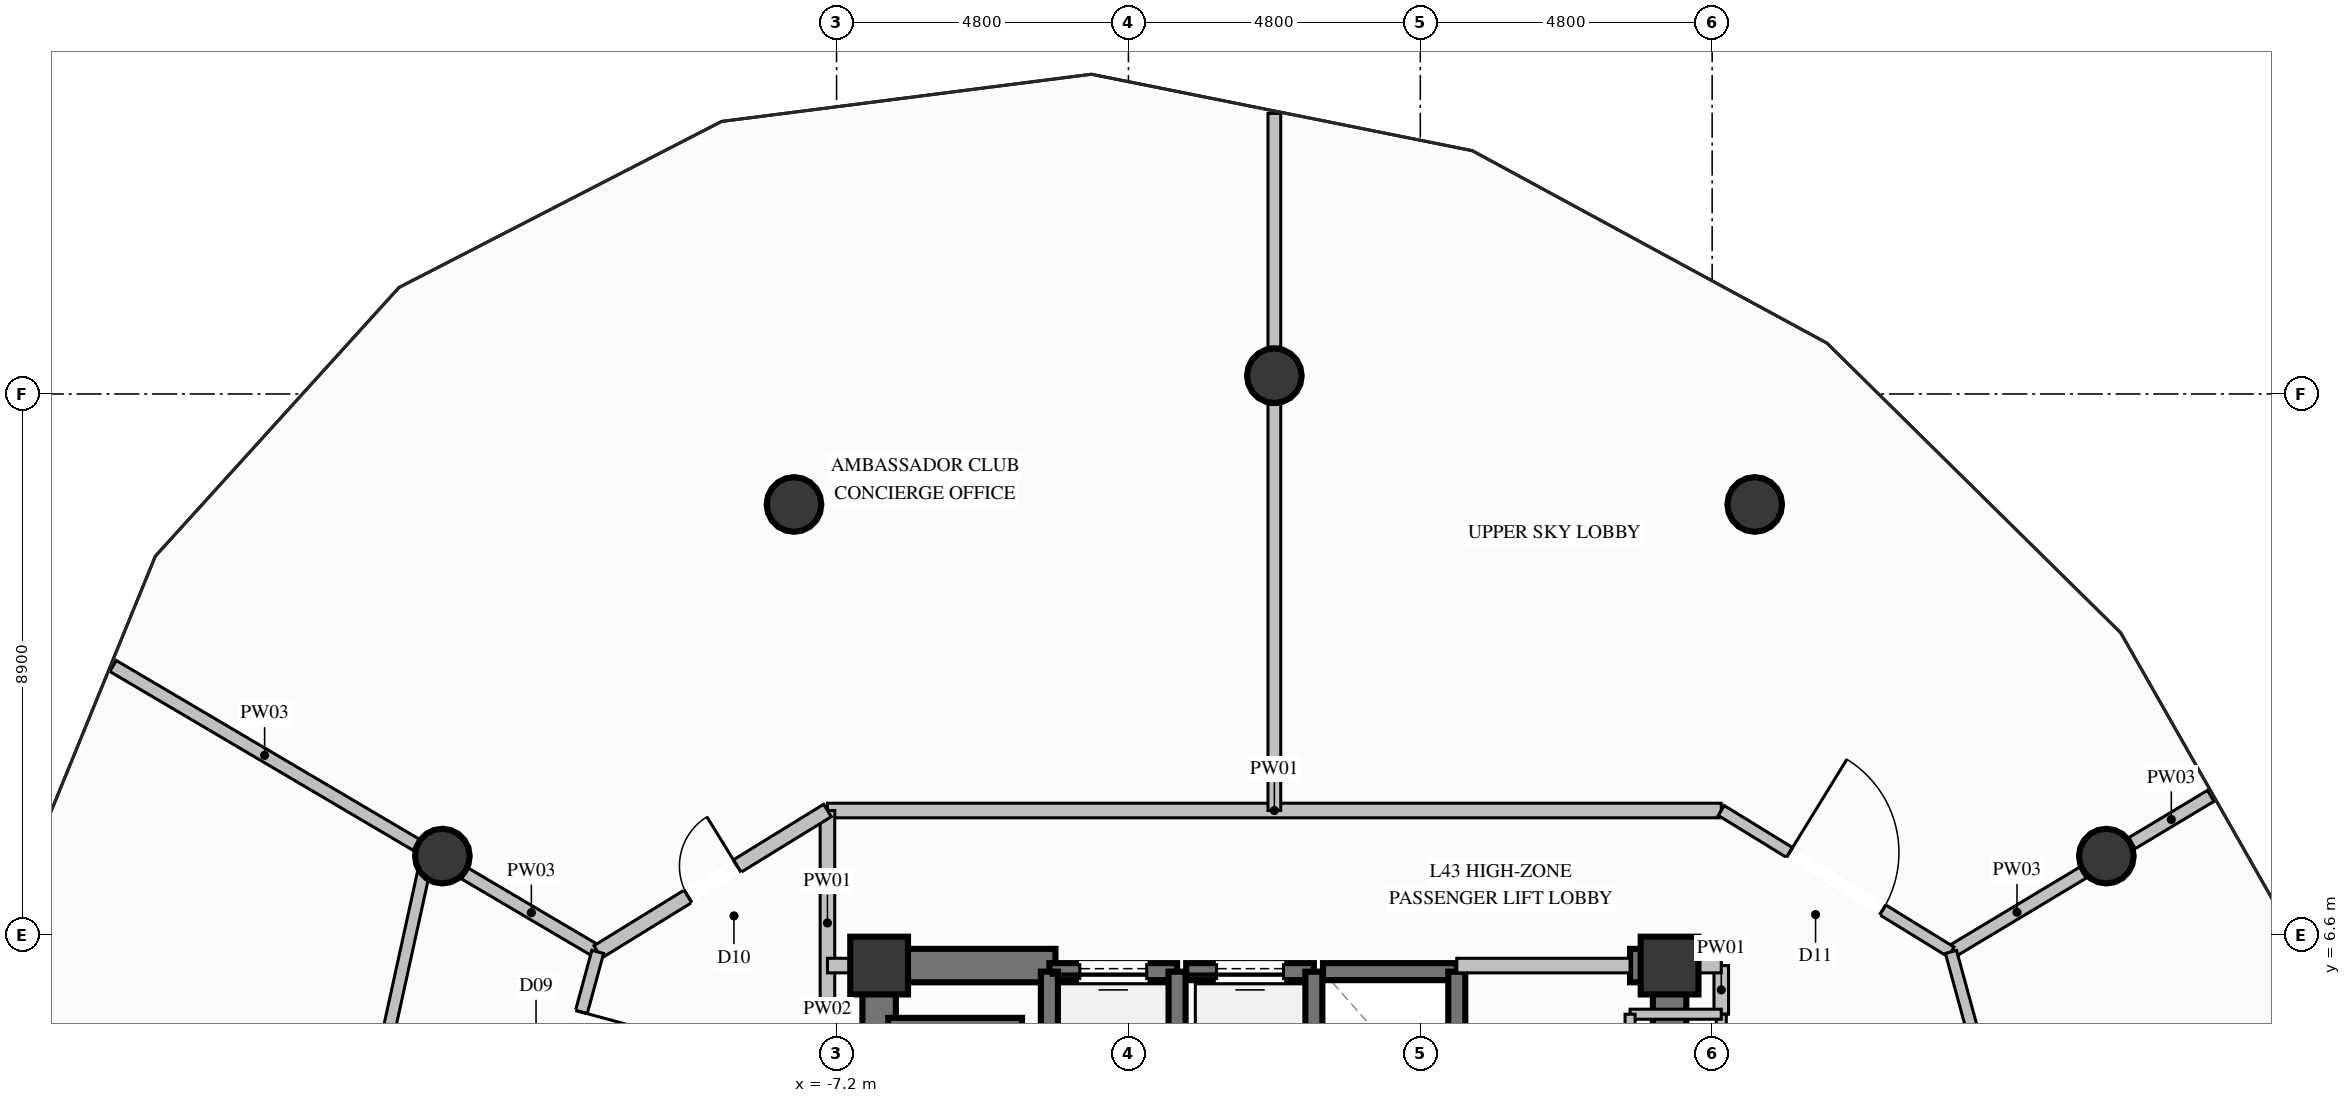
"""IFC4 building model, lengths in metres.
Left out: names, types, materials, properties, quantities, classifications, styles, units other than length and angle.
Written with IfcOpenShell. Run it as: python <this file> out.ifc"""

import sys

from ifc_helpers import new_model, si_unit, direction, frame, frame_2d, origin, origin_2d, place, context, subcontext, project, spatial, rectangle, circle, extrude, element, fill, save


model = new_model("IFC4")
c1 = context("Model", 3, precision=1e-05, world=origin(), true_north=direction((0.0, 1.0)))
c2 = subcontext(c1, "Body", "Model", "MODEL_VIEW")
j1 = project(units=[si_unit("LENGTHUNIT", "METRE"), si_unit("PLANEANGLEUNIT", "RADIAN")], contexts=[c1])
p1 = place(None, origin())
s1 = spatial("IfcSite", under=j1, at=p1, CompositionType="ELEMENT")
p2 = place(p1, origin())
s2 = spatial("IfcBuilding", under=s1, at=p2, CompositionType="ELEMENT")
p3 = place(p2, frame((0.0, 0.0, 168.6)))
s3 = spatial("IfcBuildingStorey", under=s2, at=p3, CompositionType="ELEMENT", Elevation=168.6)
for number, where, z_axis, x_axis in (
    (1, (6.5, 6.1, 0.0), (0.0, 0.0, 1.0), (1.0, 0.0, 0.0)),
    (2, (-6.5, 6.1, 0.0), (0.0, 0.0, 1.0), (1.0, 0.0, 0.0)),
):
    element("IfcColumn", number, at=place(p3, frame(where, z_axis=z_axis, x_axis=x_axis)), inside=s3, PredefinedType="COLUMN", context=c2, shape_type="SweptSolid", body=[
        extrude(rectangle(XDim=0.95, YDim=0.95, at=origin_2d()), origin(), (0.0, 0.0, 1.0), 4.6),
    ])
p4 = place(p3, frame((-6.225, 6.1, 0.0), z_axis=(0.0, 0.0, 1.0), x_axis=(1.0, 0.0, 0.0)))
e3 = element("IfcWall", 3, at=p4, inside=s3, PredefinedType="SHEAR", context=c2, shape_type="SweptSolid", body=[
    extrude(rectangle(XDim=2.625, YDim=0.55, at=frame_2d((1.312, 0.0))), origin(), (0.0, 0.0, 1.0), 4.6),
])
p5 = place(p3, frame((5.85, 6.1, 0.0), z_axis=(0.0, 0.0, 1.0), x_axis=(1.0, 0.0, 0.0)))
e4 = element("IfcWall", 4, at=p5, inside=s3, PredefinedType="SHEAR", context=c2, shape_type="SweptSolid", body=[
    extrude(rectangle(XDim=0.375, YDim=0.55, at=frame_2d((0.188, 0.0))), origin(), (0.0, 0.0, 1.0), 4.6),
])
p6 = place(p3, frame((-6.5, 2.35, 0.0), z_axis=(0.0, 0.0, 1.0), x_axis=(0.0, 1.0, 0.0)))
e5 = element("IfcWall", 5, at=p6, inside=s3, PredefinedType="SHEAR", context=c2, shape_type="SweptSolid", body=[
    extrude(rectangle(XDim=4.025, YDim=0.55, at=frame_2d((2.012, 0.0))), origin(), (0.0, 0.0, 1.0), 4.6),
])
p7 = place(p3, frame((6.5, 3.35, 0.0), z_axis=(0.0, 0.0, 1.0), x_axis=(0.0, 1.0, 0.0)))
e6 = element("IfcWall", 6, at=p7, inside=s3, PredefinedType="SHEAR", context=c2, shape_type="SweptSolid", body=[
    extrude(rectangle(XDim=3.025, YDim=0.55, at=frame_2d((1.512, 0.0))), origin(), (0.0, 0.0, 1.0), 4.6),
])
for number, where, z_axis, x_axis in (
    (7, (13.683, 7.9, 0.0), (0.0, 0.0, 1.0), (1.0, 0.0, 0.0)),
    (8, (7.9, 13.683, 0.0), (0.0, 0.0, 1.0), (1.0, 0.0, 0.0)),
    (9, (0.0, 15.8, 0.0), (0.0, 0.0, 1.0), (1.0, 0.0, 0.0)),
    (10, (-7.9, 13.683, 0.0), (0.0, 0.0, 1.0), (1.0, 0.0, 0.0)),
    (11, (-13.683, 7.9, 0.0), (0.0, 0.0, 1.0), (1.0, 0.0, 0.0)),
):
    element("IfcColumn", number, at=place(p3, frame(where, z_axis=z_axis, x_axis=x_axis)), inside=s3, PredefinedType="COLUMN", context=c2, shape_type="SweptSolid", body=[
        extrude(circle(Radius=0.45, at=origin_2d()), origin(), (0.0, 0.0, 1.0), 4.6),
    ])
p8 = place(p3, frame((-1.6, 6.0, 0.0), z_axis=(0.0, 0.0, 1.0), x_axis=(-1.0, 0.0, 0.0)))
e12 = element("IfcWall", 12, at=p8, inside=s3, PredefinedType="SOLIDWALL", context=c2, shape_type="SweptSolid", body=[
    extrude(rectangle(XDim=2.1, YDim=0.28, at=frame_2d((1.05, 0.0))), origin(), (0.0, 0.0, 1.0), 4.36),
])
p9 = place(p8, frame((0.5, 0.0, 0.0)))
e13 = element("IfcOpeningElement", 13, at=p9, cuts=e12, PredefinedType="OPENING", context=c2, shape_type="SweptSolid", body=[
    extrude(rectangle(XDim=1.1, YDim=2.2, at=frame_2d((0.55, 1.1))), frame((0.0, 0.15, 0.0), z_axis=(0.0, -1.0, 0.0), x_axis=(1.0, 0.0, 0.0)), (0.0, 0.0, 1.0), 0.3),
])
for number, where, z_axis, x_axis in (
    (14, (-3.7, 6.0, 0.0), (0.0, 0.0, 1.0), (0.0, -1.0, 0.0)),
    (15, (-1.6, 3.5, 0.0), (0.0, 0.0, 1.0), (0.0, 1.0, 0.0)),
):
    element("IfcWall", number, at=place(p3, frame(where, z_axis=z_axis, x_axis=x_axis)), inside=s3, PredefinedType="SOLIDWALL", context=c2, shape_type="SweptSolid", body=[
        extrude(rectangle(XDim=2.5, YDim=0.28, at=frame_2d((1.25, 0.0))), origin(), (0.0, 0.0, 1.0), 4.36),
    ])
p10 = place(p3, frame((0.65, 6.0, 0.0), z_axis=(0.0, 0.0, 1.0), x_axis=(-1.0, 0.0, 0.0)))
e16 = element("IfcWall", 16, at=p10, inside=s3, PredefinedType="SOLIDWALL", context=c2, shape_type="SweptSolid", body=[
    extrude(rectangle(XDim=2.1, YDim=0.28, at=frame_2d((1.05, 0.0))), origin(), (0.0, 0.0, 1.0), 4.36),
])
p11 = place(p10, frame((0.5, 0.0, 0.0)))
e17 = element("IfcOpeningElement", 17, at=p11, cuts=e16, PredefinedType="OPENING", context=c2, shape_type="SweptSolid", body=[
    extrude(rectangle(XDim=1.1, YDim=2.2, at=frame_2d((0.55, 1.1))), frame((0.0, 0.15, 0.0), z_axis=(0.0, -1.0, 0.0), x_axis=(1.0, 0.0, 0.0)), (0.0, 0.0, 1.0), 0.3),
])
p12 = place(p3, frame((0.65, 3.5, 0.0), z_axis=(0.0, 0.0, 1.0), x_axis=(0.0, 1.0, 0.0)))
e18 = element("IfcWall", 18, at=p12, inside=s3, PredefinedType="SOLIDWALL", context=c2, shape_type="SweptSolid", body=[
    extrude(rectangle(XDim=2.5, YDim=0.28, at=frame_2d((1.25, 0.0))), origin(), (0.0, 0.0, 1.0), 4.36),
])
p13 = place(p3, frame((3.0, 6.0, 0.0), z_axis=(0.0, 0.0, 1.0), x_axis=(-1.0, 0.0, 0.0)))
e19 = element("IfcWall", 19, at=p13, inside=s3, PredefinedType="SOLIDWALL", context=c2, shape_type="SweptSolid", body=[
    extrude(rectangle(XDim=2.2, YDim=0.28, at=frame_2d((1.1, 0.0))), origin(), (0.0, 0.0, 1.0), 4.36),
])
p14 = place(p3, frame((3.0, 3.5, 0.0), z_axis=(0.0, 0.0, 1.0), x_axis=(0.0, 1.0, 0.0)))
e20 = element("IfcWall", 20, at=p14, inside=s3, PredefinedType="SOLIDWALL", context=c2, shape_type="SweptSolid", body=[
    extrude(rectangle(XDim=2.5, YDim=0.28, at=frame_2d((1.25, 0.0))), origin(), (0.0, 0.0, 1.0), 4.36),
])
p15 = place(p3, frame((-4.15, 5.1, 0.0), z_axis=(0.0, 0.0, 1.0), x_axis=(-1.0, 0.0, 0.0)))
e21 = element("IfcWall", 21, at=p15, inside=s3, PredefinedType="SOLIDWALL", context=c2, shape_type="SweptSolid", body=[
    extrude(rectangle(XDim=2.2, YDim=0.28, at=frame_2d((1.1, 0.0))), origin(), (0.0, 0.0, 1.0), 4.36),
])
p16 = place(p3, frame((-7.35, 8.65, 0.0), z_axis=(0.0, 0.0, 1.0), x_axis=(1.0, 0.0, 0.0)))
e22 = element("IfcWall", 22, at=p16, inside=s3, PredefinedType="PARTITIONING", context=c2, shape_type="SweptSolid", body=[
    extrude(rectangle(XDim=14.7, YDim=0.24, at=frame_2d((7.35, 0.0))), origin(), (0.0, 0.0, 1.0), 4.36),
])
p17 = place(p3, frame((3.0, 6.1, 0.0), z_axis=(0.0, 0.0, 1.0), x_axis=(1.0, 0.0, 0.0)))
e23 = element("IfcWall", 23, at=p17, inside=s3, PredefinedType="PARTITIONING", context=c2, shape_type="SweptSolid", body=[
    extrude(rectangle(XDim=2.85, YDim=0.24, at=frame_2d((1.425, 0.0))), origin(), (0.0, 0.0, 1.0), 3.245),
])
p18 = place(p3, frame((7.35, 5.3, 0.0), z_axis=(0.0, 0.0, 1.0), x_axis=(0.0, 1.0, 0.0)))
e24 = element("IfcWall", 24, at=p18, inside=s3, PredefinedType="PARTITIONING", context=c2, shape_type="SweptSolid", body=[
    extrude(rectangle(XDim=0.8, YDim=0.24, at=frame_2d((0.4, 0.0))), origin(), (0.0, 0.0, 1.0), 3.245),
])
p19 = place(p3, frame((6.5, 6.1, 0.0), z_axis=(0.0, 0.0, 1.0), x_axis=(1.0, 0.0, 0.0)))
e25 = element("IfcWall", 25, at=p19, inside=s3, PredefinedType="PARTITIONING", context=c2, shape_type="SweptSolid", body=[
    extrude(rectangle(XDim=0.85, YDim=0.24, at=frame_2d((0.425, 0.0))), origin(), (0.0, 0.0, 1.0), 3.877),
])
p20 = place(p3, frame((-7.35, 4.95, 0.0), z_axis=(0.0, 0.0, 1.0), x_axis=(0.0, 1.0, 0.0)))
e26 = element("IfcWall", 26, at=p20, inside=s3, PredefinedType="PARTITIONING", context=c2, shape_type="SweptSolid", body=[
    extrude(rectangle(XDim=3.7, YDim=0.24, at=frame_2d((1.85, 0.0))), origin(), (0.0, 0.0, 1.0), 3.245),
])
p21 = place(p3, frame((-7.35, 6.1, 0.0), z_axis=(0.0, 0.0, 1.0), x_axis=(1.0, 0.0, 0.0)))
e27 = element("IfcWall", 27, at=p21, inside=s3, PredefinedType="PARTITIONING", context=c2, shape_type="SweptSolid", body=[
    extrude(rectangle(XDim=0.85, YDim=0.24, at=frame_2d((0.425, 0.0))), origin(), (0.0, 0.0, 1.0), 3.877),
])
p22 = place(p3, frame((7.35, 2.75, 0.0), z_axis=(0.0, 0.0, 1.0), x_axis=(0.0, 1.0, 0.0)))
e28 = element("IfcWall", 28, at=p22, inside=s3, PredefinedType="PARTITIONING", context=c2, shape_type="SweptSolid", body=[
    extrude(rectangle(XDim=2.55, YDim=0.165, at=frame_2d((1.275, 0.0))), origin(), (0.0, 0.0, 1.0), 3.245),
])
p23 = place(p22, frame((0.8, 0.0, 0.0)))
e29 = element("IfcOpeningElement", 29, at=p23, cuts=e28, PredefinedType="OPENING", context=c2, shape_type="SweptSolid", body=[
    extrude(rectangle(XDim=0.95, YDim=2.1, at=frame_2d((0.475, 1.05))), frame((0.0, 0.093, 0.0), z_axis=(0.0, -1.0, 0.0), x_axis=(1.0, 0.0, 0.0)), (0.0, 0.0, 1.0), 0.185),
])
p24 = place(p3, frame((7.35, 5.3, 0.0), z_axis=(0.0, 0.0, 1.0), x_axis=(-1.0, 0.0, 0.0)))
e30 = element("IfcWall", 30, at=p24, inside=s3, PredefinedType="PARTITIONING", context=c2, shape_type="SweptSolid", body=[
    extrude(rectangle(XDim=1.5, YDim=0.165, at=frame_2d((0.75, 0.0))), origin(), (0.0, 0.0, 1.0), 3.245),
])
p25 = place(p3, frame((5.85, 5.3, 0.0), z_axis=(0.0, 0.0, 1.0), x_axis=(0.0, -1.0, 0.0)))
e31 = element("IfcWall", 31, at=p25, inside=s3, PredefinedType="PARTITIONING", context=c2, shape_type="SweptSolid", body=[
    extrude(rectangle(XDim=2.55, YDim=0.165, at=frame_2d((1.275, 0.0))), origin(), (0.0, 0.0, 1.0), 3.245),
])
p26 = place(p3, frame((11.128, 6.325, 0.0), z_axis=(0.0, 0.0, 1.0), x_axis=(0.857271697039, 0.514864290328, 0.0)))
e32 = element("IfcWall", 32, at=p26, inside=s3, PredefinedType="PARTITIONING", context=c2, shape_type="SweptSolid", body=[
    extrude(rectangle(XDim=2.533, YDim=0.21, at=frame_2d((1.266, 0.0))), origin(), (0.0, 0.0, 1.0), 3.877),
])
p27 = place(p3, frame((14.103, 8.112, 0.0), z_axis=(0.0, 0.0, 1.0), x_axis=(0.857222267269, 0.514946584122, 0.0)))
e33 = element("IfcWall", 33, at=p27, inside=s3, PredefinedType="PARTITIONING", context=c2, shape_type="SweptSolid", body=[
    extrude(rectangle(XDim=1.513, YDim=0.21, at=frame_2d((0.756, 0.0))), origin(), (0.0, 0.0, 1.0), 4.36),
])
p28 = place(p3, frame((-11.128, 6.325, 0.0), z_axis=(0.0, 0.0, 1.0), x_axis=(-0.861259983765, 0.508164579998, 0.0)))
e34 = element("IfcWall", 34, at=p28, inside=s3, PredefinedType="PARTITIONING", context=c2, shape_type="SweptSolid", body=[
    extrude(rectangle(XDim=2.535, YDim=0.21, at=frame_2d((1.267, 0.0))), origin(), (0.0, 0.0, 1.0), 3.877),
])
p29 = place(p3, frame((-14.114, 8.087, 0.0), z_axis=(0.0, 0.0, 1.0), x_axis=(-0.861346971608, 0.508017120284, 0.0)))
e35 = element("IfcWall", 35, at=p29, inside=s3, PredefinedType="PARTITIONING", context=c2, shape_type="SweptSolid", body=[
    extrude(rectangle(XDim=5.788, YDim=0.21, at=frame_2d((2.894, 0.0))), origin(), (0.0, 0.0, 1.0), 4.36),
])
p30 = place(p3, frame((7.35, 8.65, 0.0), z_axis=(0.0, 0.0, 1.0), x_axis=(0.851645088617, -0.524118920699, 0.0)))
e36 = element("IfcWall", 36, at=p30, inside=s3, PredefinedType="PARTITIONING", context=c2, shape_type="SweptSolid", body=[
    extrude(rectangle(XDim=4.436, YDim=0.19, at=frame_2d((2.218, 0.0))), origin(), (0.0, 0.0, 1.0), 4.36),
])
p31 = place(p30, frame((1.318, 0.0, 0.0)))
e37 = element("IfcOpeningElement", 37, at=p31, cuts=e36, PredefinedType="OPENING", context=c2, shape_type="SweptSolid", body=[
    extrude(rectangle(XDim=1.8, YDim=2.4, at=frame_2d((0.9, 1.2))), frame((0.0, 0.105, 0.0), z_axis=(0.0, -1.0, 0.0), x_axis=(1.0, 0.0, 0.0)), (0.0, 0.0, 1.0), 0.21),
])
p32 = place(p3, frame((0.0, 8.65, 0.0), z_axis=(0.0, 0.0, 1.0), x_axis=(0.0, 1.0, 0.0)))
e38 = element("IfcWall", 38, at=p32, inside=s3, PredefinedType="PARTITIONING", context=c2, shape_type="SweptSolid", body=[
    extrude(rectangle(XDim=6.68, YDim=0.21, at=frame_2d((3.34, 0.0))), origin(), (0.0, 0.0, 1.0), 4.36),
])
p33 = place(p3, frame((0.0, 16.27, 0.0), z_axis=(0.0, 0.0, 1.0), x_axis=(0.0, 1.0, 0.0)))
e39 = element("IfcWall", 39, at=p33, inside=s3, PredefinedType="PARTITIONING", context=c2, shape_type="SweptSolid", body=[
    extrude(rectangle(XDim=3.844, YDim=0.21, at=frame_2d((1.922, 0.0))), origin(), (0.0, 0.0, 1.0), 4.36),
])
p34 = place(p3, frame((-11.128, 6.325, 0.0), z_axis=(0.0, 0.0, 1.0), x_axis=(0.851645088617, 0.524118920699, 0.0)))
e40 = element("IfcWall", 40, at=p34, inside=s3, PredefinedType="PARTITIONING", context=c2, shape_type="SweptSolid", body=[
    extrude(rectangle(XDim=4.436, YDim=0.24, at=frame_2d((2.218, 0.0))), origin(), (0.0, 0.0, 1.0), 4.36),
])
p35 = place(p34, frame((1.743, 0.0, 0.0)))
e41 = element("IfcOpeningElement", 41, at=p35, cuts=e40, PredefinedType="OPENING", context=c2, shape_type="SweptSolid", body=[
    extrude(rectangle(XDim=0.95, YDim=2.1, at=frame_2d((0.475, 1.05))), frame((0.0, 0.13, 0.0), z_axis=(0.0, -1.0, 0.0), x_axis=(1.0, 0.0, 0.0)), (0.0, 0.0, 1.0), 0.26),
])
p36 = place(p3, frame((-11.128, 6.325, 0.0), z_axis=(0.0, 0.0, 1.0), x_axis=(-0.262795224233, -0.964851631144, 0.0)))
e42 = element("IfcWall", 42, at=p36, inside=s3, PredefinedType="PLUMBINGWALL", context=c2, shape_type="SweptSolid", body=[
    extrude(rectangle(XDim=2.95, YDim=0.2, at=frame_2d((1.475, 0.0))), origin(), (0.0, 0.0, 1.0), 4.36),
])
p37 = place(p36, frame((1.025, 0.0, 0.0)))
e43 = element("IfcOpeningElement", 43, at=p37, cuts=e42, PredefinedType="OPENING", context=c2, shape_type="SweptSolid", body=[
    extrude(rectangle(XDim=0.9, YDim=2.1, at=frame_2d((0.45, 1.05))), frame((0.0, 0.11, 0.0), z_axis=(0.0, -1.0, 0.0), x_axis=(1.0, 0.0, 0.0)), (0.0, 0.0, 1.0), 0.22),
])
p38 = place(p3, frame((-13.918, 7.971, 0.0), z_axis=(0.0, 0.0, 1.0), x_axis=(-0.214339227221, -0.976759282359, 0.0)))
e44 = element("IfcWall", 44, at=p38, inside=s3, PredefinedType="PLUMBINGWALL", context=c2, shape_type="SweptSolid", body=[
    extrude(rectangle(XDim=3.672, YDim=0.2, at=frame_2d((1.836, 0.0))), origin(), (0.0, 0.0, 1.0), 3.929),
])
p39 = place(p3, frame((12.85, 0.0, 0.0), z_axis=(0.0, 0.0, 1.0), x_axis=(-0.262717156474, 0.964872890952, 0.0)))
e45 = element("IfcWall", 45, at=p39, inside=s3, PredefinedType="PARTITIONING", context=c2, shape_type="SweptSolid", body=[
    extrude(rectangle(XDim=6.555, YDim=0.19, at=frame_2d((3.278, 0.0))), origin(), (0.0, 0.0, 1.0), 4.36),
])
p40 = place(p9, origin())
e46 = element("IfcDoor", 46, at=p40, inside=s3, OperationType="SLIDING_TO_LEFT", PredefinedType="DOOR", context=c2, shape_type="SweptSolid", body=[
    extrude(rectangle(XDim=1.1, YDim=2.2, at=frame_2d((0.55, 1.1))), frame((0.0, 0.025, 0.0), z_axis=(0.0, -1.0, 0.0), x_axis=(1.0, 0.0, 0.0)), (0.0, 0.0, 1.0), 0.05),
])
fill(e13, e46)
p41 = place(p11, origin())
e47 = element("IfcDoor", 47, at=p41, inside=s3, OperationType="SLIDING_TO_LEFT", PredefinedType="DOOR", context=c2, shape_type="SweptSolid", body=[
    extrude(rectangle(XDim=1.1, YDim=2.2, at=frame_2d((0.55, 1.1))), frame((0.0, 0.025, 0.0), z_axis=(0.0, -1.0, 0.0), x_axis=(1.0, 0.0, 0.0)), (0.0, 0.0, 1.0), 0.05),
])
fill(e17, e47)
p42 = place(p31, origin())
e48 = element("IfcDoor", 48, at=p42, inside=s3, OperationType="SINGLE_SWING_LEFT", PredefinedType="DOOR", context=c2, shape_type="SweptSolid", body=[
    extrude(rectangle(XDim=1.8, YDim=2.4, at=frame_2d((0.9, 1.2))), frame((0.0, 0.025, 0.0), z_axis=(0.0, -1.0, 0.0), x_axis=(1.0, 0.0, 0.0)), (0.0, 0.0, 1.0), 0.05),
])
fill(e37, e48)
p43 = place(p35, origin())
e49 = element("IfcDoor", 49, at=p43, inside=s3, OperationType="SINGLE_SWING_RIGHT", PredefinedType="DOOR", context=c2, shape_type="SweptSolid", body=[
    extrude(rectangle(XDim=0.95, YDim=2.1, at=frame_2d((0.475, 1.05))), frame((0.0, 0.025, 0.0), z_axis=(0.0, -1.0, 0.0), x_axis=(1.0, 0.0, 0.0)), (0.0, 0.0, 1.0), 0.05),
])
fill(e41, e49)
p44 = place(p37, origin())
e50 = element("IfcDoor", 50, at=p44, inside=s3, OperationType="SINGLE_SWING_LEFT", PredefinedType="DOOR", context=c2, shape_type="SweptSolid", body=[
    extrude(rectangle(XDim=0.9, YDim=2.1, at=frame_2d((0.45, 1.05))), frame((0.0, 0.025, 0.0), z_axis=(0.0, -1.0, 0.0), x_axis=(1.0, 0.0, 0.0)), (0.0, 0.0, 1.0), 0.05),
])
fill(e43, e50)
save(model, sys.argv[1])
